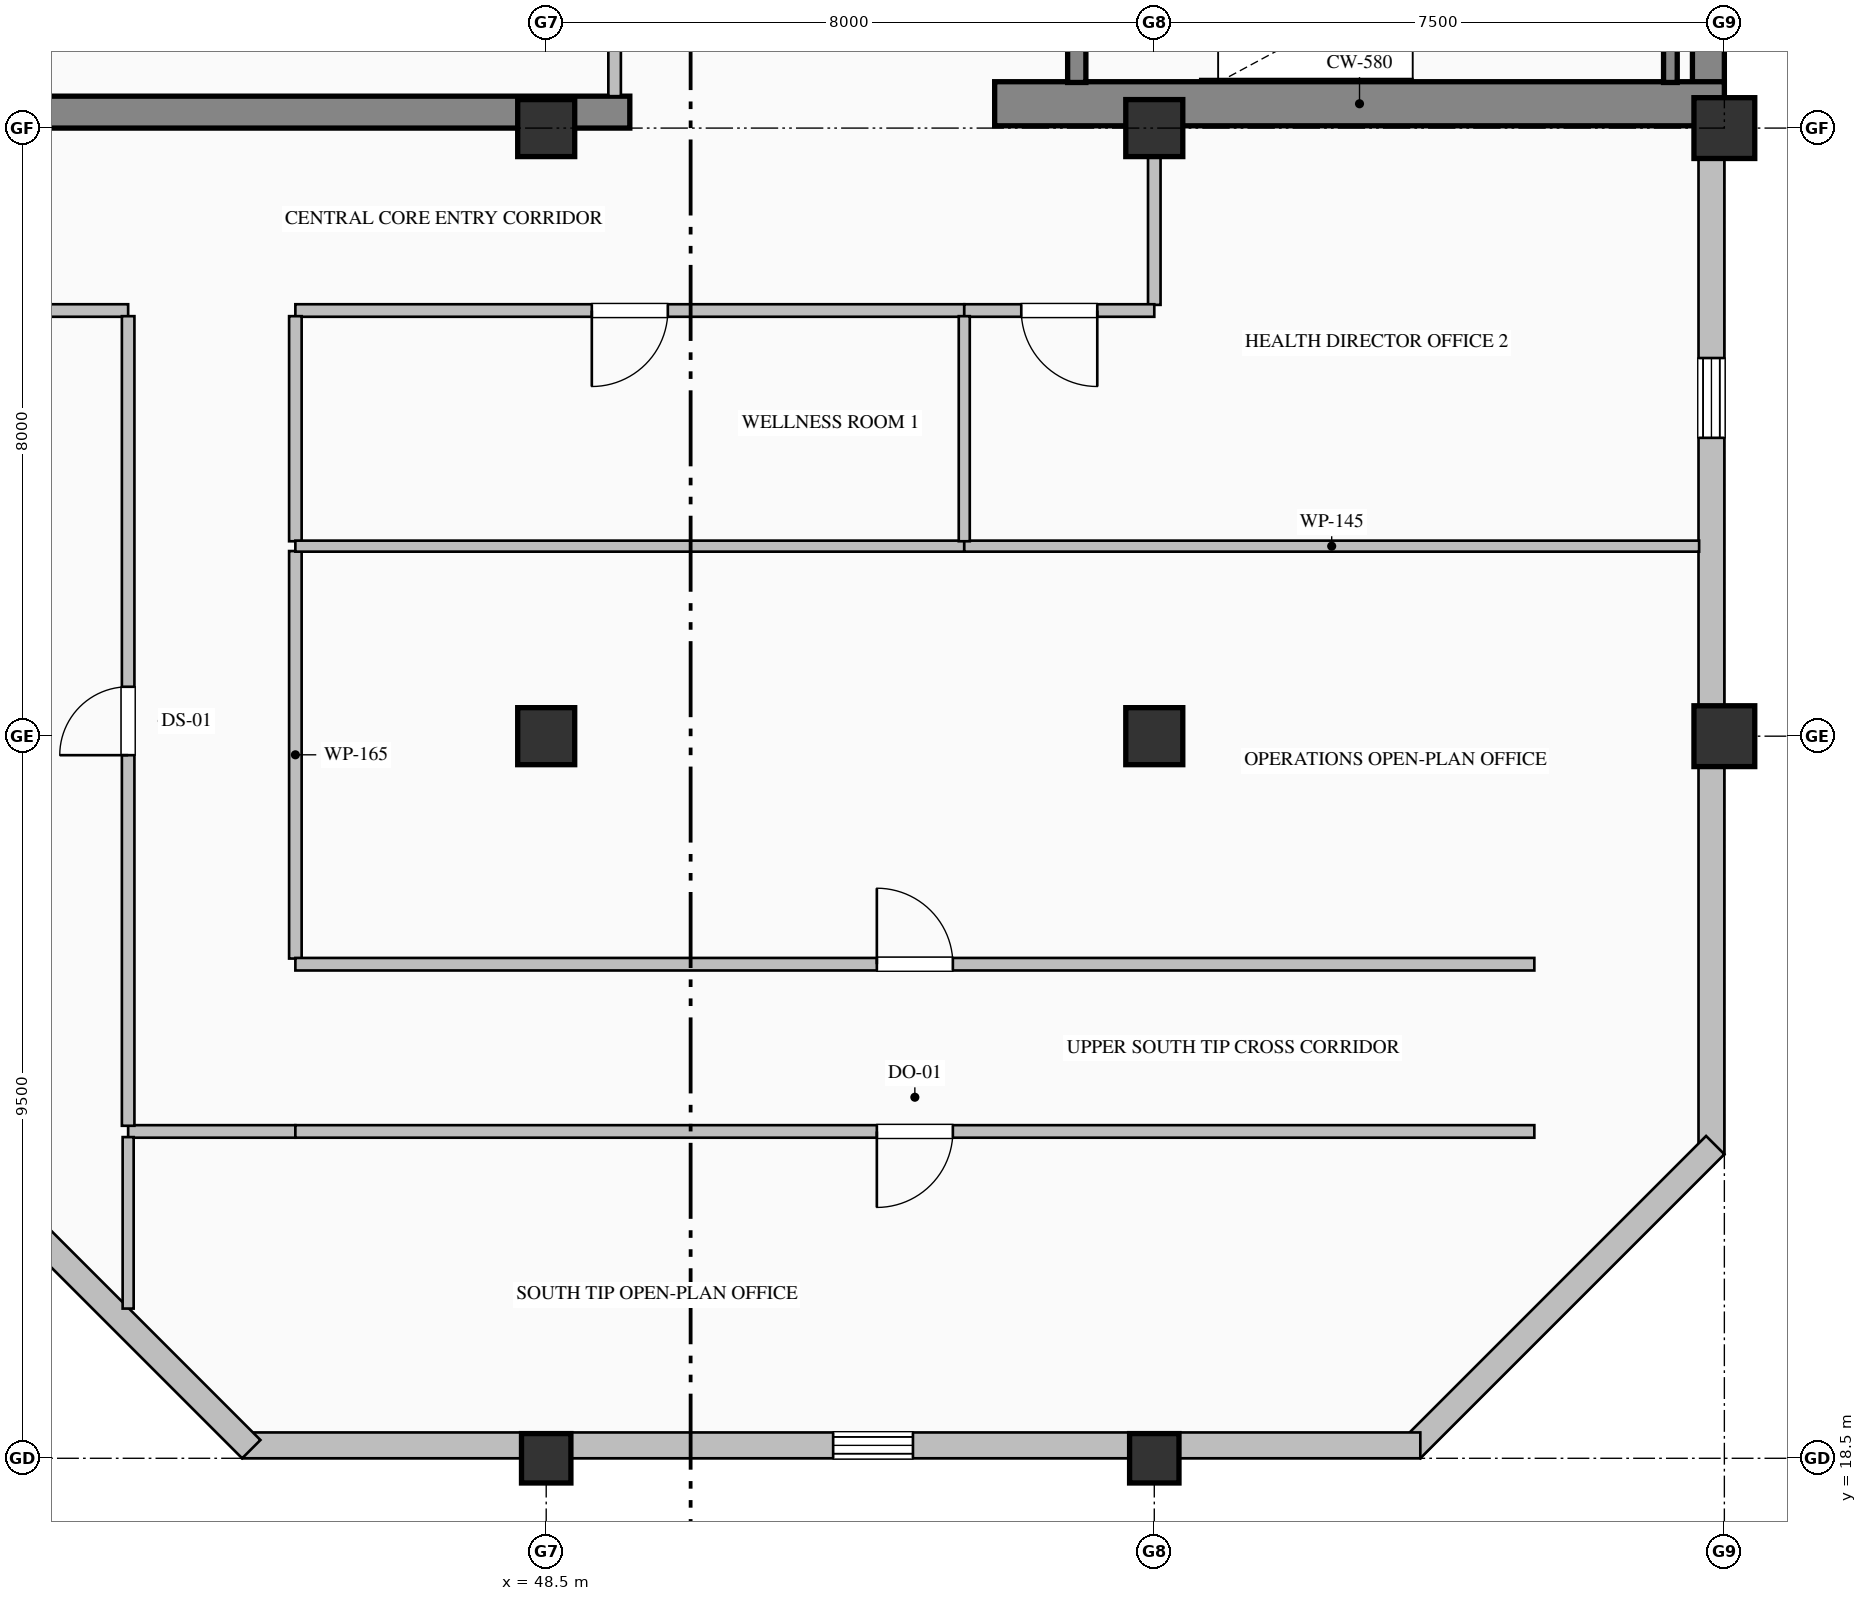
"""IFC4 building model, lengths in metres.
Left out: names, types, materials, properties, quantities, classifications, styles, units other than length and angle.
Written with IfcOpenShell. Run it as: python <this file> out.ifc"""

import sys

from ifc_helpers import new_model, si_unit, direction, frame, frame_2d, origin, origin_2d, place, context, subcontext, project, spatial, rectangle, hollow_rectangle, extrude, element, fill, save


model = new_model("IFC4")
c1 = context("Model", 3, precision=1e-05, world=origin(), true_north=direction((0.0, 1.0)))
c2 = subcontext(c1, "Body", "Model", "MODEL_VIEW")
j1 = project(units=[si_unit("LENGTHUNIT", "METRE"), si_unit("PLANEANGLEUNIT", "RADIAN")], contexts=[c1])
p1 = place(None, origin())
s1 = spatial("IfcSite", under=j1, at=p1, CompositionType="ELEMENT")
p2 = place(p1, origin())
s2 = spatial("IfcBuilding", under=s1, at=p2, CompositionType="ELEMENT")
p3 = place(p2, frame((0.0, 0.0, 339.2)))
s3 = spatial("IfcBuildingStorey", under=s2, at=p3, CompositionType="ELEMENT", Elevation=339.2)
p4 = place(p3, frame((63.79, 36.32, 0.0), z_axis=(0.0, 0.0, 1.0), x_axis=(0.0, 1.0, 0.0)))
e1 = element("IfcWall", 1, at=p4, inside=s3, PredefinedType="SHEAR", context=c2, shape_type="SweptSolid", body=[
    extrude(rectangle(XDim=15.26, YDim=0.42, at=frame_2d((7.63, 0.0))), origin(), (0.0, 0.0, 1.0), 3.785),
])
p5 = place(p3, frame((40.5, 36.21, 0.0), z_axis=(0.0, 0.0, 1.0), x_axis=(1.0, 0.0, 0.0)))
e2 = element("IfcWall", 2, at=p5, inside=s3, PredefinedType="SHEAR", context=c2, shape_type="SweptSolid", body=[
    extrude(rectangle(XDim=9.1, YDim=0.42, at=frame_2d((4.55, 0.0))), origin(), (0.0, 0.0, 1.0), 3.785),
])
p6 = place(p3, frame((54.4, 36.32, 0.0), z_axis=(0.0, 0.0, 1.0), x_axis=(1.0, 0.0, 0.0)))
e3 = element("IfcWall", 3, at=p6, inside=s3, PredefinedType="SHEAR", context=c2, shape_type="SweptSolid", body=[
    extrude(rectangle(XDim=9.6, YDim=0.58, at=frame_2d((4.8, 0.0))), origin(), (0.0, 0.0, 1.0), 4.0),
])
p7 = place(p3, frame((48.5, 18.5, 0.0), z_axis=(0.0, 0.0, 1.0), x_axis=(1.0, 0.0, 0.0)))
e4 = element("IfcColumn", 4, at=p7, inside=s3, PredefinedType="COLUMN", context=c2, shape_type="SweptSolid", body=[
    extrude(hollow_rectangle(XDim=0.65, YDim=0.65, WallThickness=0.028, at=origin_2d()), origin(), (0.0, 0.0, 1.0), 4.0),
])
for number, where, z_axis, x_axis in (
    (5, (48.5, 28.0, 0.0), (0.0, 0.0, 1.0), (1.0, 0.0, 0.0)),
    (6, (48.5, 36.0, 0.0), (0.0, 0.0, 1.0), (1.0, 0.0, 0.0)),
):
    element("IfcColumn", number, at=place(p3, frame(where, z_axis=z_axis, x_axis=x_axis)), inside=s3, PredefinedType="COLUMN", context=c2, shape_type="SweptSolid", body=[
        extrude(rectangle(XDim=0.75, YDim=0.75, at=origin_2d()), origin(), (0.0, 0.0, 1.0), 4.0),
    ])
p8 = place(p3, frame((56.5, 18.5, 0.0), z_axis=(0.0, 0.0, 1.0), x_axis=(1.0, 0.0, 0.0)))
e7 = element("IfcColumn", 7, at=p8, inside=s3, PredefinedType="COLUMN", context=c2, shape_type="SweptSolid", body=[
    extrude(hollow_rectangle(XDim=0.65, YDim=0.65, WallThickness=0.028, at=origin_2d()), origin(), (0.0, 0.0, 1.0), 4.0),
])
for number, where, z_axis, x_axis in (
    (8, (56.5, 28.0, 0.0), (0.0, 0.0, 1.0), (1.0, 0.0, 0.0)),
    (9, (56.5, 36.0, 0.0), (0.0, 0.0, 1.0), (1.0, 0.0, 0.0)),
):
    element("IfcColumn", number, at=place(p3, frame(where, z_axis=z_axis, x_axis=x_axis)), inside=s3, PredefinedType="COLUMN", context=c2, shape_type="SweptSolid", body=[
        extrude(rectangle(XDim=0.75, YDim=0.75, at=origin_2d()), origin(), (0.0, 0.0, 1.0), 4.0),
    ])
for number, where, z_axis, x_axis in (
    (10, (64.0, 28.0, 0.0), (0.0, 0.0, 1.0), (1.0, 0.0, 0.0)),
    (11, (64.0, 36.0, 0.0), (0.0, 0.0, 1.0), (1.0, 0.0, 0.0)),
):
    element("IfcColumn", number, at=place(p3, frame(where, z_axis=z_axis, x_axis=x_axis)), inside=s3, PredefinedType="COLUMN", context=c2, shape_type="SweptSolid", body=[
        extrude(hollow_rectangle(XDim=0.8, YDim=0.8, WallThickness=0.032, at=origin_2d()), origin(), (0.0, 0.0, 1.0), 4.0),
    ])
p9 = place(p3, frame((63.83, 36.05, 0.0), z_axis=(0.0, 0.0, 1.0), x_axis=(0.0, -1.0, 0.0)))
e12 = element("IfcWall", 12, at=p9, inside=s3, PredefinedType="SOLIDWALL", context=c2, shape_type="SweptSolid", body=[
    extrude(rectangle(XDim=13.55, YDim=0.34, at=frame_2d((6.775, 0.0))), origin(), (0.0, 0.0, 1.0), 3.335),
])
p10 = place(p9, frame((3.075, 0.0, 0.8)))
e13 = element("IfcOpeningElement", 13, at=p10, cuts=e12, PredefinedType="OPENING", context=c2, shape_type="SweptSolid", body=[
    extrude(rectangle(XDim=1.05, YDim=2.15, at=frame_2d((0.525, 1.075))), frame((0.0, 0.18, 0.0), z_axis=(0.0, -1.0, 0.0), x_axis=(1.0, 0.0, 0.0)), (0.0, 0.0, 1.0), 0.36),
])
p11 = place(p3, frame((63.88, 22.62, 0.0), z_axis=(0.0, 0.0, 1.0), x_axis=(-0.707106781187, -0.707106781187, 0.0)))
e14 = element("IfcWall", 14, at=p11, inside=s3, PredefinedType="SOLIDWALL", context=c2, shape_type="SweptSolid", body=[
    extrude(rectangle(XDim=5.657, YDim=0.34, at=frame_2d((2.828, 0.0))), origin(), (0.0, 0.0, 1.0), 3.785),
])
p12 = place(p3, frame((60.0, 18.67, 0.0), z_axis=(0.0, 0.0, 1.0), x_axis=(-1.0, 0.0, 0.0)))
e15 = element("IfcWall", 15, at=p12, inside=s3, PredefinedType="SOLIDWALL", context=c2, shape_type="SweptSolid", body=[
    extrude(rectangle(XDim=15.5, YDim=0.34, at=frame_2d((7.75, 0.0))), origin(), (0.0, 0.0, 1.0), 3.335),
])
p13 = place(p12, frame((6.675, 0.0, 0.8)))
e16 = element("IfcOpeningElement", 16, at=p13, cuts=e15, PredefinedType="OPENING", context=c2, shape_type="SweptSolid", body=[
    extrude(rectangle(XDim=1.05, YDim=2.15, at=frame_2d((0.525, 1.075))), frame((0.0, 0.18, 0.0), z_axis=(0.0, -1.0, 0.0), x_axis=(1.0, 0.0, 0.0)), (0.0, 0.0, 1.0), 0.36),
])
p14 = place(p3, frame((44.62, 18.62, 0.0), z_axis=(0.0, 0.0, 1.0), x_axis=(-0.707106781187, 0.707106781187, 0.0)))
e17 = element("IfcWall", 17, at=p14, inside=s3, PredefinedType="SOLIDWALL", context=c2, shape_type="SweptSolid", body=[
    extrude(rectangle(XDim=5.657, YDim=0.34, at=frame_2d((2.828, 0.0))), origin(), (0.0, 0.0, 1.0), 3.785),
])
p15 = place(p3, frame((55.48, 39.75, 0.0), z_axis=(0.0, 0.0, 1.0), x_axis=(0.0, -1.0, 0.0)))
e18 = element("IfcWall", 18, at=p15, inside=s3, PredefinedType="SOLIDWALL", context=c2, shape_type="SweptSolid", body=[
    extrude(rectangle(XDim=3.15, YDim=0.24, at=frame_2d((1.575, 0.0))), origin(), (0.0, 0.0, 1.0), 4.0),
])
p16 = place(p15, frame((1.0, 0.0, 0.0)))
e19 = element("IfcOpeningElement", 19, at=p16, cuts=e18, PredefinedType="OPENING", context=c2, shape_type="SweptSolid", body=[
    extrude(rectangle(XDim=1.15, YDim=2.2, at=frame_2d((0.575, 1.1))), frame((0.0, 0.13, 0.0), z_axis=(0.0, -1.0, 0.0), x_axis=(1.0, 0.0, 0.0)), (0.0, 0.0, 1.0), 0.26),
])
p17 = place(p3, frame((63.29, 36.6, 0.0), z_axis=(0.0, 0.0, 1.0), x_axis=(0.0, 1.0, 0.0)))
e20 = element("IfcWall", 20, at=p17, inside=s3, PredefinedType="SOLIDWALL", context=c2, shape_type="SweptSolid", body=[
    extrude(rectangle(XDim=3.15, YDim=0.18, at=frame_2d((1.575, 0.0))), origin(), (0.0, 0.0, 1.0), 4.0),
])
p18 = place(p3, frame((49.4, 36.42, 0.0), z_axis=(0.0, 0.0, 1.0), x_axis=(0.0, 1.0, 0.0)))
e21 = element("IfcWall", 21, at=p18, inside=s3, PredefinedType="PARTITIONING", context=c2, shape_type="SweptSolid", body=[
    extrude(rectangle(XDim=7.73, YDim=0.165, at=frame_2d((3.865, 0.0))), origin(), (0.0, 0.0, 1.0), 3.027),
])
p19 = place(p18, frame((3.365, 0.0, 0.0)))
e22 = element("IfcOpeningElement", 22, at=p19, cuts=e21, PredefinedType="OPENING", context=c2, shape_type="SweptSolid", body=[
    extrude(rectangle(XDim=1.0, YDim=2.15, at=frame_2d((0.5, 1.075))), frame((0.0, 0.093, 0.0), z_axis=(0.0, -1.0, 0.0), x_axis=(1.0, 0.0, 0.0)), (0.0, 0.0, 1.0), 0.185),
])
p20 = place(p3, frame((54.0, 33.6, 0.0), z_axis=(0.0, 0.0, 1.0), x_axis=(-1.0, 0.0, 0.0)))
e23 = element("IfcWall", 23, at=p20, inside=s3, PredefinedType="PARTITIONING", context=c2, shape_type="SweptSolid", body=[
    extrude(rectangle(XDim=8.8, YDim=0.165, at=frame_2d((4.4, 0.0))), origin(), (0.0, 0.0, 1.0), 3.785),
])
p21 = place(p20, frame((3.9, 0.0, 0.0)))
e24 = element("IfcOpeningElement", 24, at=p21, cuts=e23, PredefinedType="OPENING", context=c2, shape_type="SweptSolid", body=[
    extrude(rectangle(XDim=1.0, YDim=2.15, at=frame_2d((0.5, 1.075))), frame((0.0, 0.093, 0.0), z_axis=(0.0, -1.0, 0.0), x_axis=(1.0, 0.0, 0.0)), (0.0, 0.0, 1.0), 0.185),
])
p22 = place(p3, frame((56.5, 36.0, 0.0), z_axis=(0.0, 0.0, 1.0), x_axis=(0.0, -1.0, 0.0)))
e25 = element("IfcWall", 25, at=p22, inside=s3, PredefinedType="PARTITIONING", context=c2, shape_type="SweptSolid", body=[
    extrude(rectangle(XDim=2.325, YDim=0.165, at=frame_2d((1.163, 0.0))), origin(), (0.0, 0.0, 1.0), 3.177),
])
p23 = place(p3, frame((56.5, 33.6, 0.0), z_axis=(0.0, 0.0, 1.0), x_axis=(-1.0, 0.0, 0.0)))
e26 = element("IfcWall", 26, at=p23, inside=s3, PredefinedType="PARTITIONING", context=c2, shape_type="SweptSolid", body=[
    extrude(rectangle(XDim=2.5, YDim=0.165, at=frame_2d((1.25, 0.0))), origin(), (0.0, 0.0, 1.0), 3.785),
])
p24 = place(p23, frame((0.75, 0.0, 0.0)))
e27 = element("IfcOpeningElement", 27, at=p24, cuts=e26, PredefinedType="OPENING", context=c2, shape_type="SweptSolid", body=[
    extrude(rectangle(XDim=1.0, YDim=2.15, at=frame_2d((0.5, 1.075))), frame((0.0, 0.093, 0.0), z_axis=(0.0, -1.0, 0.0), x_axis=(1.0, 0.0, 0.0)), (0.0, 0.0, 1.0), 0.185),
])
p25 = place(p3, frame((43.0, 33.6, 0.0), z_axis=(0.0, 0.0, 1.0), x_axis=(-1.0, 0.0, 0.0)))
e28 = element("IfcWall", 28, at=p25, inside=s3, PredefinedType="PARTITIONING", context=c2, shape_type="SweptSolid", body=[
    extrude(rectangle(XDim=2.5, YDim=0.165, at=frame_2d((1.25, 0.0))), origin(), (0.0, 0.0, 1.0), 3.785),
])
p26 = place(p3, frame((45.2, 22.8, 0.0), z_axis=(0.0, 0.0, 1.0), x_axis=(-1.0, 0.0, 0.0)))
e29 = element("IfcWall", 29, at=p26, inside=s3, PredefinedType="PARTITIONING", context=c2, shape_type="SweptSolid", body=[
    extrude(rectangle(XDim=2.2, YDim=0.165, at=frame_2d((1.1, 0.0))), origin(), (0.0, 0.0, 1.0), 3.785),
])
p27 = place(p3, frame((45.2, 30.436, 0.0), z_axis=(0.0, 0.0, 1.0), x_axis=(0.0, -1.0, 0.0)))
e30 = element("IfcWall", 30, at=p27, inside=s3, PredefinedType="PARTITIONING", context=c2, shape_type="SweptSolid", body=[
    extrude(rectangle(XDim=5.361, YDim=0.165, at=frame_2d((2.681, 0.0))), origin(), (0.0, 0.0, 1.0), 3.785),
])
p28 = place(p3, frame((45.2, 33.525, 0.0), z_axis=(0.0, 0.0, 1.0), x_axis=(0.0, -1.0, 0.0)))
e31 = element("IfcWall", 31, at=p28, inside=s3, PredefinedType="PARTITIONING", context=c2, shape_type="SweptSolid", body=[
    extrude(rectangle(XDim=2.961, YDim=0.165, at=frame_2d((1.48, 0.0))), origin(), (0.0, 0.0, 1.0), 3.785),
])
p29 = place(p3, frame((43.0, 22.875, 0.0), z_axis=(0.0, 0.0, 1.0), x_axis=(0.0, 1.0, 0.0)))
e32 = element("IfcWall", 32, at=p29, inside=s3, PredefinedType="PARTITIONING", context=c2, shape_type="SweptSolid", body=[
    extrude(rectangle(XDim=10.651, YDim=0.165, at=frame_2d((5.325, 0.0))), origin(), (0.0, 0.0, 1.0), 3.785),
])
p30 = place(p29, frame((4.875, 0.0, 0.0)))
e33 = element("IfcOpeningElement", 33, at=p30, cuts=e32, PredefinedType="OPENING", context=c2, shape_type="SweptSolid", body=[
    extrude(rectangle(XDim=0.9, YDim=2.15, at=frame_2d((0.45, 1.075))), frame((0.0, 0.093, 0.0), z_axis=(0.0, -1.0, 0.0), x_axis=(1.0, 0.0, 0.0)), (0.0, 0.0, 1.0), 0.185),
])
p31 = place(p3, frame((61.5, 22.8, 0.0), z_axis=(0.0, 0.0, 1.0), x_axis=(-1.0, 0.0, 0.0)))
e34 = element("IfcWall", 34, at=p31, inside=s3, PredefinedType="PARTITIONING", context=c2, shape_type="SweptSolid", body=[
    extrude(rectangle(XDim=16.3, YDim=0.165, at=frame_2d((8.15, 0.0))), origin(), (0.0, 0.0, 1.0), 3.785),
])
p32 = place(p31, frame((7.65, 0.0, 0.0)))
e35 = element("IfcOpeningElement", 35, at=p32, cuts=e34, PredefinedType="OPENING", context=c2, shape_type="SweptSolid", body=[
    extrude(rectangle(XDim=1.0, YDim=2.15, at=frame_2d((0.5, 1.075))), frame((0.0, 0.093, 0.0), z_axis=(0.0, -1.0, 0.0), x_axis=(1.0, 0.0, 0.0)), (0.0, 0.0, 1.0), 0.185),
])
p33 = place(p3, frame((45.2, 25.0, 0.0), z_axis=(0.0, 0.0, 1.0), x_axis=(1.0, 0.0, 0.0)))
e36 = element("IfcWall", 36, at=p33, inside=s3, PredefinedType="PARTITIONING", context=c2, shape_type="SweptSolid", body=[
    extrude(rectangle(XDim=16.3, YDim=0.165, at=frame_2d((8.15, 0.0))), origin(), (0.0, 0.0, 1.0), 3.785),
])
p34 = place(p33, frame((7.65, 0.0, 0.0)))
e37 = element("IfcOpeningElement", 37, at=p34, cuts=e36, PredefinedType="OPENING", context=c2, shape_type="SweptSolid", body=[
    extrude(rectangle(XDim=1.0, YDim=2.15, at=frame_2d((0.5, 1.075))), frame((0.0, 0.093, 0.0), z_axis=(0.0, -1.0, 0.0), x_axis=(1.0, 0.0, 0.0)), (0.0, 0.0, 1.0), 0.185),
])
p35 = place(p3, frame((43.0, 20.469, 0.0), z_axis=(0.0, 0.0, 1.0), x_axis=(0.0, 1.0, 0.0)))
e38 = element("IfcWall", 38, at=p35, inside=s3, PredefinedType="PARTITIONING", context=c2, shape_type="SweptSolid", body=[
    extrude(rectangle(XDim=2.256, YDim=0.145, at=frame_2d((1.128, 0.0))), origin(), (0.0, 0.0, 1.0), 3.785),
])
p36 = place(p3, frame((45.2, 30.5, 0.0), z_axis=(0.0, 0.0, 1.0), x_axis=(1.0, 0.0, 0.0)))
e39 = element("IfcWall", 39, at=p36, inside=s3, PredefinedType="PARTITIONING", context=c2, shape_type="SweptSolid", body=[
    extrude(rectangle(XDim=8.8, YDim=0.145, at=frame_2d((4.4, 0.0))), origin(), (0.0, 0.0, 1.0), 3.785),
])
p37 = place(p3, frame((54.0, 30.5, 0.0), z_axis=(0.0, 0.0, 1.0), x_axis=(1.0, 0.0, 0.0)))
e40 = element("IfcWall", 40, at=p37, inside=s3, PredefinedType="PARTITIONING", context=c2, shape_type="SweptSolid", body=[
    extrude(rectangle(XDim=9.668, YDim=0.145, at=frame_2d((4.834, 0.0))), origin(), (0.0, 0.0, 1.0), 3.785),
])
p38 = place(p3, frame((54.0, 33.525, 0.0), z_axis=(0.0, 0.0, 1.0), x_axis=(0.0, -1.0, 0.0)))
e41 = element("IfcWall", 41, at=p38, inside=s3, PredefinedType="PARTITIONING", context=c2, shape_type="SweptSolid", body=[
    extrude(rectangle(XDim=2.961, YDim=0.145, at=frame_2d((1.48, 0.0))), origin(), (0.0, 0.0, 1.0), 3.785),
])
p39 = place(p10, origin())
e42 = element("IfcWindow", 42, at=p39, inside=s3, PartitioningType="SINGLE_PANEL", PredefinedType="WINDOW", context=c2, shape_type="SweptSolid", body=[
    extrude(rectangle(XDim=1.05, YDim=2.15, at=frame_2d((0.525, 1.075))), frame((0.0, 0.15, 0.0), z_axis=(0.0, -1.0, 0.0), x_axis=(1.0, 0.0, 0.0)), (0.0, 0.0, 1.0), 0.06),
])
fill(e13, e42)
p40 = place(p13, origin())
e43 = element("IfcWindow", 43, at=p40, inside=s3, PartitioningType="SINGLE_PANEL", PredefinedType="WINDOW", context=c2, shape_type="SweptSolid", body=[
    extrude(rectangle(XDim=1.05, YDim=2.15, at=frame_2d((0.525, 1.075))), frame((0.0, 0.15, 0.0), z_axis=(0.0, -1.0, 0.0), x_axis=(1.0, 0.0, 0.0)), (0.0, 0.0, 1.0), 0.06),
])
fill(e16, e43)
p41 = place(p32, origin())
e44 = element("IfcDoor", 44, at=p41, inside=s3, OperationType="SINGLE_SWING_RIGHT", PredefinedType="DOOR", context=c2, shape_type="SweptSolid", body=[
    extrude(rectangle(XDim=1.0, YDim=2.15, at=frame_2d((0.5, 1.075))), frame((0.0, 0.025, 0.0), z_axis=(0.0, -1.0, 0.0), x_axis=(1.0, 0.0, 0.0)), (0.0, 0.0, 1.0), 0.05),
])
fill(e35, e44)
p42 = place(p34, origin())
e45 = element("IfcDoor", 45, at=p42, inside=s3, OperationType="SINGLE_SWING_LEFT", PredefinedType="DOOR", context=c2, shape_type="SweptSolid", body=[
    extrude(rectangle(XDim=1.0, YDim=2.15, at=frame_2d((0.5, 1.075))), frame((0.0, 0.025, 0.0), z_axis=(0.0, -1.0, 0.0), x_axis=(1.0, 0.0, 0.0)), (0.0, 0.0, 1.0), 0.05),
])
fill(e37, e45)
p43 = place(p21, origin())
e46 = element("IfcDoor", 46, at=p43, inside=s3, OperationType="SINGLE_SWING_RIGHT", PredefinedType="DOOR", context=c2, shape_type="SweptSolid", body=[
    extrude(rectangle(XDim=1.0, YDim=2.15, at=frame_2d((0.5, 1.075))), frame((0.0, 0.025, 0.0), z_axis=(0.0, -1.0, 0.0), x_axis=(1.0, 0.0, 0.0)), (0.0, 0.0, 1.0), 0.05),
])
fill(e24, e46)
p44 = place(p24, origin())
e47 = element("IfcDoor", 47, at=p44, inside=s3, OperationType="SINGLE_SWING_LEFT", PredefinedType="DOOR", context=c2, shape_type="SweptSolid", body=[
    extrude(rectangle(XDim=1.0, YDim=2.15, at=frame_2d((0.5, 1.075))), frame((0.0, 0.025, 0.0), z_axis=(0.0, -1.0, 0.0), x_axis=(1.0, 0.0, 0.0)), (0.0, 0.0, 1.0), 0.05),
])
fill(e27, e47)
p45 = place(p30, origin())
e48 = element("IfcDoor", 48, at=p45, inside=s3, OperationType="SINGLE_SWING_LEFT", PredefinedType="DOOR", context=c2, shape_type="SweptSolid", body=[
    extrude(rectangle(XDim=0.9, YDim=2.15, at=frame_2d((0.45, 1.075))), frame((0.0, 0.025, 0.0), z_axis=(0.0, -1.0, 0.0), x_axis=(1.0, 0.0, 0.0)), (0.0, 0.0, 1.0), 0.05),
])
fill(e33, e48)
save(model, sys.argv[1])
